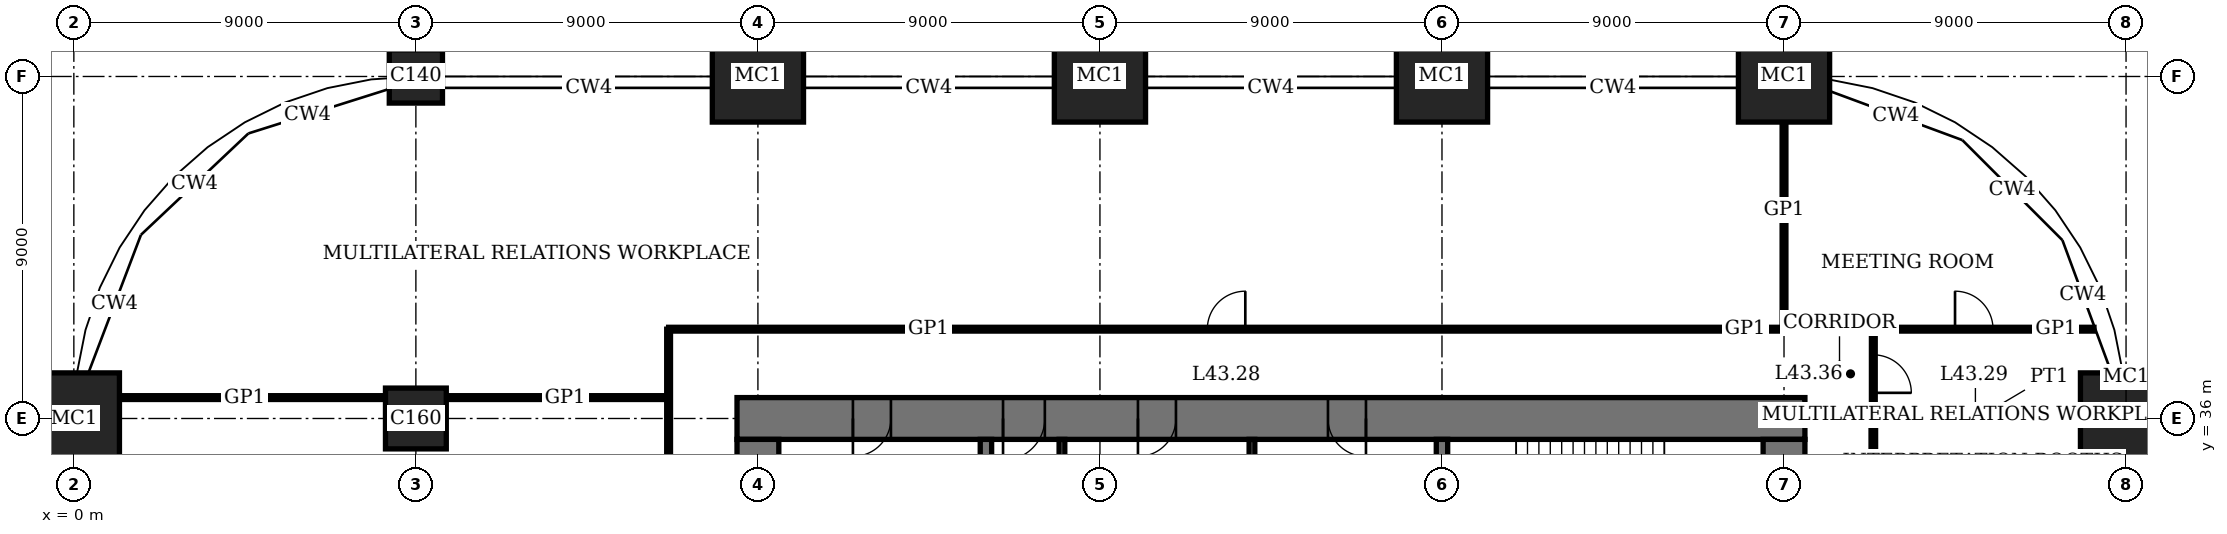
"""IFC4 building model, lengths in metres.
Left out: names, types, materials, properties, quantities, classifications, styles, units other than length and angle.
Written with IfcOpenShell. Run it as: python <this file> out.ifc"""

import sys

from ifc_helpers import new_model, si_unit, direction, frame, frame_2d, origin, origin_2d, place, context, subcontext, project, spatial, rectangle, extrude, element, fill, save


model = new_model("IFC4")
c1 = context("Model", 3, precision=1e-05, world=origin(), true_north=direction((0.0, 1.0)))
c2 = subcontext(c1, "Body", "Model", "MODEL_VIEW")
j1 = project(units=[si_unit("LENGTHUNIT", "METRE"), si_unit("PLANEANGLEUNIT", "RADIAN")], contexts=[c1])
p1 = place(None, origin())
s1 = spatial("IfcSite", under=j1, at=p1, CompositionType="ELEMENT")
p2 = place(p1, origin())
s2 = spatial("IfcBuilding", under=s1, at=p2, CompositionType="ELEMENT")
p3 = place(p2, frame((0.0, 0.0, 178.2)))
s3 = spatial("IfcBuildingStorey", under=s2, at=p3, CompositionType="ELEMENT", Elevation=178.2)
p4 = place(p3, frame((0.0, 36.0, 0.0), z_axis=(0.0, 0.0, 1.0), x_axis=(1.0, 0.0, 0.0)))
e1 = element("IfcColumn", 1, at=p4, inside=s3, PredefinedType="COLUMN", context=c2, shape_type="SweptSolid", body=[
    extrude(rectangle(XDim=2.4, YDim=2.4, at=origin_2d()), origin(), (0.0, 0.0, 1.0), 4.0),
])
p5 = place(p3, frame((9.0, 36.0, 0.0), z_axis=(0.0, 0.0, 1.0), x_axis=(1.0, 0.0, 0.0)))
e2 = element("IfcColumn", 2, at=p5, inside=s3, PredefinedType="COLUMN", context=c2, shape_type="SweptSolid", body=[
    extrude(rectangle(XDim=1.6, YDim=1.6, at=origin_2d()), origin(), (0.0, 0.0, 1.0), 4.0),
])
p6 = place(p3, frame((9.0, 45.0, 0.0), z_axis=(0.0, 0.0, 1.0), x_axis=(1.0, 0.0, 0.0)))
e3 = element("IfcColumn", 3, at=p6, inside=s3, PredefinedType="COLUMN", context=c2, shape_type="SweptSolid", body=[
    extrude(rectangle(XDim=1.4, YDim=1.4, at=origin_2d()), origin(), (0.0, 0.0, 1.0), 4.0),
])
for number, where, z_axis, x_axis in (
    (4, (18.0, 45.0, 0.0), (0.0, 0.0, 1.0), (1.0, 0.0, 0.0)),
    (5, (27.0, 45.0, 0.0), (0.0, 0.0, 1.0), (1.0, 0.0, 0.0)),
    (6, (36.0, 45.0, 0.0), (0.0, 0.0, 1.0), (1.0, 0.0, 0.0)),
    (7, (45.0, 45.0, 0.0), (0.0, 0.0, 1.0), (1.0, 0.0, 0.0)),
    (8, (54.0, 36.0, 0.0), (0.0, 0.0, 1.0), (1.0, 0.0, 0.0)),
):
    element("IfcColumn", number, at=place(p3, frame(where, z_axis=z_axis, x_axis=x_axis)), inside=s3, PredefinedType="COLUMN", context=c2, shape_type="SweptSolid", body=[
        extrude(rectangle(XDim=2.4, YDim=2.4, at=origin_2d()), origin(), (0.0, 0.0, 1.0), 4.0),
    ])
p7 = place(p3, frame((45.55, 36.0, 0.0), z_axis=(0.0, 0.0, 1.0), x_axis=(-1.0, 0.0, 0.0)))
e9 = element("IfcWall", 9, at=p7, inside=s3, PredefinedType="SHEAR", context=c2, shape_type="SweptSolid", body=[
    extrude(rectangle(XDim=28.1, YDim=1.1, at=frame_2d((14.05, 0.0))), origin(), (0.0, 0.0, 1.0), 4.0),
])
p8 = place(p7, frame((11.55, 0.0, 0.0)))
e10 = element("IfcOpeningElement", 10, at=p8, cuts=e9, PredefinedType="OPENING", context=c2, shape_type="SweptSolid", body=[
    extrude(rectangle(XDim=1.0, YDim=2.4, at=frame_2d((0.5, 1.2))), frame((0.0, 0.56, 0.0), z_axis=(0.0, -1.0, 0.0), x_axis=(1.0, 0.0, 0.0)), (0.0, 0.0, 1.0), 1.12),
])
p9 = place(p7, frame((16.55, 0.0, 0.0)))
e11 = element("IfcOpeningElement", 11, at=p9, cuts=e9, PredefinedType="OPENING", context=c2, shape_type="SweptSolid", body=[
    extrude(rectangle(XDim=1.0, YDim=2.4, at=frame_2d((0.5, 1.2))), frame((0.0, 0.56, 0.0), z_axis=(0.0, -1.0, 0.0), x_axis=(1.0, 0.0, 0.0)), (0.0, 0.0, 1.0), 1.12),
])
p10 = place(p7, frame((20.0, 0.0, 0.0)))
e12 = element("IfcOpeningElement", 12, at=p10, cuts=e9, PredefinedType="OPENING", context=c2, shape_type="SweptSolid", body=[
    extrude(rectangle(XDim=1.1, YDim=2.4, at=frame_2d((0.55, 1.2))), frame((0.0, 0.56, 0.0), z_axis=(0.0, -1.0, 0.0), x_axis=(1.0, 0.0, 0.0)), (0.0, 0.0, 1.0), 1.12),
])
p11 = place(p7, frame((24.05, 0.0, 0.0)))
e13 = element("IfcOpeningElement", 13, at=p11, cuts=e9, PredefinedType="OPENING", context=c2, shape_type="SweptSolid", body=[
    extrude(rectangle(XDim=1.0, YDim=2.4, at=frame_2d((0.5, 1.2))), frame((0.0, 0.56, 0.0), z_axis=(0.0, -1.0, 0.0), x_axis=(1.0, 0.0, 0.0)), (0.0, 0.0, 1.0), 1.12),
])
p12 = place(p3, frame((18.0, 35.45, 0.0), z_axis=(0.0, 0.0, 1.0), x_axis=(0.0, -1.0, 0.0)))
e14 = element("IfcWall", 14, at=p12, inside=s3, PredefinedType="SHEAR", context=c2, shape_type="SweptSolid", body=[
    extrude(rectangle(XDim=16.9, YDim=1.1, at=frame_2d((8.45, 0.0))), origin(), (0.0, 0.0, 1.0), 4.0),
])
p13 = place(p12, frame((8.45, 0.0, 0.0)))
e15 = element("IfcOpeningElement", 15, at=p13, cuts=e14, PredefinedType="OPENING", context=c2, shape_type="SweptSolid", body=[
    extrude(rectangle(XDim=1.8, YDim=2.4, at=frame_2d((0.9, 1.2))), frame((0.0, 0.56, 0.0), z_axis=(0.0, -1.0, 0.0), x_axis=(1.0, 0.0, 0.0)), (0.0, 0.0, 1.0), 1.12),
])
p14 = place(p3, frame((45.0, 18.55, 0.0), z_axis=(0.0, 0.0, 1.0), x_axis=(0.0, 1.0, 0.0)))
e16 = element("IfcWall", 16, at=p14, inside=s3, PredefinedType="SHEAR", context=c2, shape_type="SweptSolid", body=[
    extrude(rectangle(XDim=16.9, YDim=1.1, at=frame_2d((8.45, 0.0))), origin(), (0.0, 0.0, 1.0), 4.0),
])
p15 = place(p14, frame((8.45, 0.0, 0.0)))
e17 = element("IfcOpeningElement", 17, at=p15, cuts=e16, PredefinedType="OPENING", context=c2, shape_type="SweptSolid", body=[
    extrude(rectangle(XDim=1.8, YDim=2.4, at=frame_2d((0.9, 1.2))), frame((0.0, 0.56, 0.0), z_axis=(0.0, -1.0, 0.0), x_axis=(1.0, 0.0, 0.0)), (0.0, 0.0, 1.0), 1.12),
])
p16 = place(p3, frame((36.0, 32.4, 0.0), z_axis=(0.0, 0.0, 1.0), x_axis=(0.0, 1.0, 0.0)))
e18 = element("IfcWall", 18, at=p16, inside=s3, PredefinedType="SHEAR", context=c2, shape_type="SweptSolid", body=[
    extrude(rectangle(XDim=3.05, YDim=0.3, at=frame_2d((1.525, 0.0))), origin(), (0.0, 0.0, 1.0), 4.0),
])
p17 = place(p3, frame((24.0, 29.55, 0.0), z_axis=(0.0, 0.0, 1.0), x_axis=(0.0, 1.0, 0.0)))
e19 = element("IfcWall", 19, at=p17, inside=s3, PredefinedType="SHEAR", context=c2, shape_type="SweptSolid", body=[
    extrude(rectangle(XDim=5.9, YDim=0.3, at=frame_2d((2.95, 0.0))), origin(), (0.0, 0.0, 1.0), 4.0),
])
p18 = place(p3, frame((47.35, 36.0, 0.0), z_axis=(0.0, 0.0, 1.0), x_axis=(1.0, 0.0, 0.0)))
e20 = element("IfcWall", 20, at=p18, inside=s3, PredefinedType="PARTITIONING", context=c2, shape_type="SweptSolid", body=[
    extrude(rectangle(XDim=5.45, YDim=0.12, at=frame_2d((2.725, 0.0))), origin(), (0.0, 0.0, 1.0), 3.05),
])
p19 = place(p3, frame((1.2, 36.55, 0.0), z_axis=(0.0, 0.0, 1.0), x_axis=(1.0, 0.0, 0.0)))
e21 = element("IfcWall", 21, at=p19, inside=s3, PredefinedType="PARTITIONING", context=c2, shape_type="SweptSolid", body=[
    extrude(rectangle(XDim=7.0, YDim=0.1, at=frame_2d((3.5, 0.0))), origin(), (0.0, 0.0, 1.0), 3.75),
])
p20 = place(p3, frame((9.8, 36.55, 0.0), z_axis=(0.0, 0.0, 1.0), x_axis=(1.0, 0.0, 0.0)))
e22 = element("IfcWall", 22, at=p20, inside=s3, PredefinedType="PARTITIONING", context=c2, shape_type="SweptSolid", body=[
    extrude(rectangle(XDim=5.85, YDim=0.1, at=frame_2d((2.925, 0.0))), origin(), (0.0, 0.0, 1.0), 3.75),
])
p21 = place(p3, frame((15.65, 38.35, 0.0), z_axis=(0.0, 0.0, 1.0), x_axis=(1.0, 0.0, 0.0)))
e23 = element("IfcWall", 23, at=p21, inside=s3, PredefinedType="PARTITIONING", context=c2, shape_type="SweptSolid", body=[
    extrude(rectangle(XDim=29.35, YDim=0.1, at=frame_2d((14.675, 0.0))), origin(), (0.0, 0.0, 1.0), 3.75),
])
p22 = place(p21, frame((14.175, 0.0, 0.0)))
e24 = element("IfcOpeningElement", 24, at=p22, cuts=e23, PredefinedType="OPENING", context=c2, shape_type="SweptSolid", body=[
    extrude(rectangle(XDim=1.0, YDim=2.4, at=frame_2d((0.5, 1.2))), frame((0.0, 0.06, 0.0), z_axis=(0.0, -1.0, 0.0), x_axis=(1.0, 0.0, 0.0)), (0.0, 0.0, 1.0), 0.12),
])
p23 = place(p3, frame((45.0, 38.35, 0.0), z_axis=(0.0, 0.0, 1.0), x_axis=(1.0, 0.0, 0.0)))
e25 = element("IfcWall", 25, at=p23, inside=s3, PredefinedType="PARTITIONING", context=c2, shape_type="SweptSolid", body=[
    extrude(rectangle(XDim=2.35, YDim=0.1, at=frame_2d((1.175, 0.0))), origin(), (0.0, 0.0, 1.0), 3.75),
])
p24 = place(p3, frame((47.35, 38.35, 0.0), z_axis=(0.0, 0.0, 1.0), x_axis=(1.0, 0.0, 0.0)))
e26 = element("IfcWall", 26, at=p24, inside=s3, PredefinedType="PARTITIONING", context=c2, shape_type="SweptSolid", body=[
    extrude(rectangle(XDim=5.806, YDim=0.1, at=frame_2d((2.903, 0.0))), origin(), (0.0, 0.0, 1.0), 3.75),
])
p25 = place(p24, frame((2.15, 0.0, 0.0)))
e27 = element("IfcOpeningElement", 27, at=p25, cuts=e26, PredefinedType="OPENING", context=c2, shape_type="SweptSolid", body=[
    extrude(rectangle(XDim=1.0, YDim=2.4, at=frame_2d((0.5, 1.2))), frame((0.0, 0.06, 0.0), z_axis=(0.0, -1.0, 0.0), x_axis=(1.0, 0.0, 0.0)), (0.0, 0.0, 1.0), 0.12),
])
p26 = place(p3, frame((15.65, 27.0, 0.0), z_axis=(0.0, 0.0, 1.0), x_axis=(0.0, 1.0, 0.0)))
e28 = element("IfcWall", 28, at=p26, inside=s3, PredefinedType="PARTITIONING", context=c2, shape_type="SweptSolid", body=[
    extrude(rectangle(XDim=11.35, YDim=0.1, at=frame_2d((5.675, 0.0))), origin(), (0.0, 0.0, 1.0), 3.75),
])
p27 = place(p3, frame((45.0, 38.35, 0.0), z_axis=(0.0, 0.0, 1.0), x_axis=(0.0, 1.0, 0.0)))
e29 = element("IfcWall", 29, at=p27, inside=s3, PredefinedType="PARTITIONING", context=c2, shape_type="SweptSolid", body=[
    extrude(rectangle(XDim=5.45, YDim=0.1, at=frame_2d((2.725, 0.0))), origin(), (0.0, 0.0, 1.0), 3.05),
])
p28 = place(p3, frame((47.35, 31.5, 0.0), z_axis=(0.0, 0.0, 1.0), x_axis=(0.0, 1.0, 0.0)))
e30 = element("IfcWall", 30, at=p28, inside=s3, PredefinedType="PARTITIONING", context=c2, shape_type="SweptSolid", body=[
    extrude(rectangle(XDim=4.5, YDim=0.12, at=frame_2d((2.25, 0.0))), origin(), (0.0, 0.0, 1.0), 3.75),
])
p29 = place(p28, frame((1.75, 0.0, 0.0)))
e31 = element("IfcOpeningElement", 31, at=p29, cuts=e30, PredefinedType="OPENING", context=c2, shape_type="SweptSolid", body=[
    extrude(rectangle(XDim=1.0, YDim=2.4, at=frame_2d((0.5, 1.2))), frame((0.0, 0.07, 0.0), z_axis=(0.0, -1.0, 0.0), x_axis=(1.0, 0.0, 0.0)), (0.0, 0.0, 1.0), 0.14),
])
p30 = place(p3, frame((47.35, 36.0, 0.0), z_axis=(0.0, 0.0, 1.0), x_axis=(0.0, 1.0, 0.0)))
e32 = element("IfcWall", 32, at=p30, inside=s3, PredefinedType="PARTITIONING", context=c2, shape_type="SweptSolid", body=[
    extrude(rectangle(XDim=2.35, YDim=0.1, at=frame_2d((1.175, 0.0))), origin(), (0.0, 0.0, 1.0), 3.75),
])
p31 = place(p30, frame((0.675, 0.0, 0.0)))
e33 = element("IfcOpeningElement", 33, at=p31, cuts=e32, PredefinedType="OPENING", context=c2, shape_type="SweptSolid", body=[
    extrude(rectangle(XDim=1.0, YDim=2.4, at=frame_2d((0.5, 1.2))), frame((0.0, 0.06, 0.0), z_axis=(0.0, -1.0, 0.0), x_axis=(1.0, 0.0, 0.0)), (0.0, 0.0, 1.0), 0.12),
])
for number, where, z_axis, x_axis in (
    (34, (31.0, 32.55, 0.0), (0.0, 0.0, 1.0), (0.0, 1.0, 0.0)),
    (35, (26.0, 32.55, 0.0), (0.0, 0.0, 1.0), (0.0, 1.0, 0.0)),
):
    element("IfcWall", number, at=place(p3, frame(where, z_axis=z_axis, x_axis=x_axis)), inside=s3, PredefinedType="PARTITIONING", context=c2, shape_type="SweptSolid", body=[
        extrude(rectangle(XDim=2.9, YDim=0.15, at=frame_2d((1.45, 0.0))), origin(), (0.0, 0.0, 1.0), 3.75),
    ])
p32 = place(p8, origin())
e36 = element("IfcDoor", 36, at=p32, inside=s3, OperationType="SINGLE_SWING_RIGHT", PredefinedType="DOOR", context=c2, shape_type="SweptSolid", body=[
    extrude(rectangle(XDim=1.0, YDim=2.4, at=frame_2d((0.5, 1.2))), frame((0.0, 0.025, 0.0), z_axis=(0.0, -1.0, 0.0), x_axis=(1.0, 0.0, 0.0)), (0.0, 0.0, 1.0), 0.05),
    extrude(rectangle(XDim=0.04, YDim=2.4, at=frame_2d((0.02, 1.2))), frame((0.0, 0.4, 0.0), z_axis=(0.0, -1.0, 0.0), x_axis=(1.0, 0.0, 0.0)), (0.0, 0.0, 1.0), 0.8),
    extrude(rectangle(XDim=0.04, YDim=2.4, at=frame_2d((0.98, 1.2))), frame((0.0, 0.4, 0.0), z_axis=(0.0, -1.0, 0.0), x_axis=(1.0, 0.0, 0.0)), (0.0, 0.0, 1.0), 0.8),
    extrude(rectangle(XDim=1.0, YDim=0.04, at=frame_2d((0.5, 2.38))), frame((0.0, 0.4, 0.0), z_axis=(0.0, -1.0, 0.0), x_axis=(1.0, 0.0, 0.0)), (0.0, 0.0, 1.0), 0.8),
])
fill(e10, e36)
p33 = place(p9, origin())
e37 = element("IfcDoor", 37, at=p33, inside=s3, OperationType="SINGLE_SWING_LEFT", PredefinedType="DOOR", context=c2, shape_type="SweptSolid", body=[
    extrude(rectangle(XDim=1.0, YDim=2.4, at=frame_2d((0.5, 1.2))), frame((0.0, 0.025, 0.0), z_axis=(0.0, -1.0, 0.0), x_axis=(1.0, 0.0, 0.0)), (0.0, 0.0, 1.0), 0.05),
    extrude(rectangle(XDim=0.04, YDim=2.4, at=frame_2d((0.02, 1.2))), frame((0.0, 0.4, 0.0), z_axis=(0.0, -1.0, 0.0), x_axis=(1.0, 0.0, 0.0)), (0.0, 0.0, 1.0), 0.8),
    extrude(rectangle(XDim=0.04, YDim=2.4, at=frame_2d((0.98, 1.2))), frame((0.0, 0.4, 0.0), z_axis=(0.0, -1.0, 0.0), x_axis=(1.0, 0.0, 0.0)), (0.0, 0.0, 1.0), 0.8),
    extrude(rectangle(XDim=1.0, YDim=0.04, at=frame_2d((0.5, 2.38))), frame((0.0, 0.4, 0.0), z_axis=(0.0, -1.0, 0.0), x_axis=(1.0, 0.0, 0.0)), (0.0, 0.0, 1.0), 0.8),
])
fill(e11, e37)
p34 = place(p10, origin())
e38 = element("IfcDoor", 38, at=p34, inside=s3, OperationType="SINGLE_SWING_LEFT", PredefinedType="DOOR", context=c2, shape_type="SweptSolid", body=[
    extrude(rectangle(XDim=1.1, YDim=2.4, at=frame_2d((0.55, 1.2))), frame((0.0, 0.025, 0.0), z_axis=(0.0, -1.0, 0.0), x_axis=(1.0, 0.0, 0.0)), (0.0, 0.0, 1.0), 0.05),
    extrude(rectangle(XDim=0.04, YDim=2.4, at=frame_2d((0.02, 1.2))), frame((0.0, 0.44, 0.0), z_axis=(0.0, -1.0, 0.0), x_axis=(1.0, 0.0, 0.0)), (0.0, 0.0, 1.0), 0.88),
    extrude(rectangle(XDim=0.04, YDim=2.4, at=frame_2d((1.08, 1.2))), frame((0.0, 0.44, 0.0), z_axis=(0.0, -1.0, 0.0), x_axis=(1.0, 0.0, 0.0)), (0.0, 0.0, 1.0), 0.88),
    extrude(rectangle(XDim=1.1, YDim=0.04, at=frame_2d((0.55, 2.38))), frame((0.0, 0.44, 0.0), z_axis=(0.0, -1.0, 0.0), x_axis=(1.0, 0.0, 0.0)), (0.0, 0.0, 1.0), 0.88),
])
fill(e12, e38)
p35 = place(p11, origin())
e39 = element("IfcDoor", 39, at=p35, inside=s3, OperationType="SINGLE_SWING_LEFT", PredefinedType="DOOR", context=c2, shape_type="SweptSolid", body=[
    extrude(rectangle(XDim=1.0, YDim=2.4, at=frame_2d((0.5, 1.2))), frame((0.0, 0.025, 0.0), z_axis=(0.0, -1.0, 0.0), x_axis=(1.0, 0.0, 0.0)), (0.0, 0.0, 1.0), 0.05),
    extrude(rectangle(XDim=0.04, YDim=2.4, at=frame_2d((0.02, 1.2))), frame((0.0, 0.4, 0.0), z_axis=(0.0, -1.0, 0.0), x_axis=(1.0, 0.0, 0.0)), (0.0, 0.0, 1.0), 0.8),
    extrude(rectangle(XDim=0.04, YDim=2.4, at=frame_2d((0.98, 1.2))), frame((0.0, 0.4, 0.0), z_axis=(0.0, -1.0, 0.0), x_axis=(1.0, 0.0, 0.0)), (0.0, 0.0, 1.0), 0.8),
    extrude(rectangle(XDim=1.0, YDim=0.04, at=frame_2d((0.5, 2.38))), frame((0.0, 0.4, 0.0), z_axis=(0.0, -1.0, 0.0), x_axis=(1.0, 0.0, 0.0)), (0.0, 0.0, 1.0), 0.8),
])
fill(e13, e39)
p36 = place(p22, origin())
e40 = element("IfcDoor", 40, at=p36, inside=s3, OperationType="SINGLE_SWING_LEFT", PredefinedType="DOOR", context=c2, shape_type="SweptSolid", body=[
    extrude(rectangle(XDim=1.0, YDim=2.4, at=frame_2d((0.5, 1.2))), frame((0.0, 0.02, 0.0), z_axis=(0.0, -1.0, 0.0), x_axis=(1.0, 0.0, 0.0)), (0.0, 0.0, 1.0), 0.04),
])
fill(e24, e40)
p37 = place(p25, origin())
e41 = element("IfcDoor", 41, at=p37, inside=s3, OperationType="SINGLE_SWING_RIGHT", PredefinedType="DOOR", context=c2, shape_type="SweptSolid", body=[
    extrude(rectangle(XDim=1.0, YDim=2.4, at=frame_2d((0.5, 1.2))), frame((0.0, 0.02, 0.0), z_axis=(0.0, -1.0, 0.0), x_axis=(1.0, 0.0, 0.0)), (0.0, 0.0, 1.0), 0.04),
])
fill(e27, e41)
p38 = place(p31, origin())
e42 = element("IfcDoor", 42, at=p38, inside=s3, OperationType="SINGLE_SWING_LEFT", PredefinedType="DOOR", context=c2, shape_type="SweptSolid", body=[
    extrude(rectangle(XDim=1.0, YDim=2.4, at=frame_2d((0.5, 1.2))), frame((0.0, 0.02, 0.0), z_axis=(0.0, -1.0, 0.0), x_axis=(1.0, 0.0, 0.0)), (0.0, 0.0, 1.0), 0.04),
])
fill(e33, e42)
save(model, sys.argv[1])
